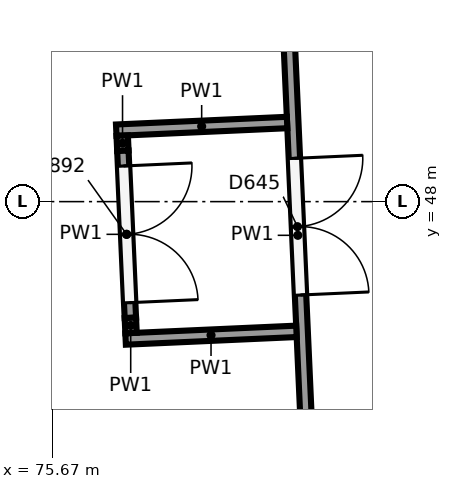
"""IFC4 building model, lengths in metres.
Left out: names, types, materials, properties, quantities, classifications, styles, units other than length and angle.
Written with IfcOpenShell. Run it as: python <this file> out.ifc"""

import sys

from ifc_helpers import new_model, si_unit, direction, frame, frame_2d, origin, place, context, subcontext, project, spatial, rectangle, extrude, element, fill, save


model = new_model("IFC4")
c1 = context("Model", 3, precision=1e-05, world=origin(), true_north=direction((0.0, 1.0)))
c2 = subcontext(c1, "Body", "Model", "MODEL_VIEW")
j1 = project(units=[si_unit("LENGTHUNIT", "METRE"), si_unit("PLANEANGLEUNIT", "RADIAN")], contexts=[c1])
p1 = place(None, origin())
s1 = spatial("IfcSite", under=j1, at=p1, CompositionType="ELEMENT")
p2 = place(p1, origin())
s2 = spatial("IfcBuilding", under=s1, at=p2, CompositionType="ELEMENT")
p3 = place(p2, frame((0.0, 0.0, 6.5)))
s3 = spatial("IfcBuildingStorey", under=s2, at=p3, CompositionType="ELEMENT", Elevation=6.5)
p4 = place(p3, frame((78.691, 52.266, 0.0), z_axis=(0.0, 0.0, 1.0), x_axis=(0.044749816806, -0.998998225172, 0.0)))
e1 = element("IfcWall", 1, at=p4, inside=s3, PredefinedType="PARTITIONING", context=c2, shape_type="SweptSolid", body=[
    extrude(rectangle(XDim=9.427, YDim=0.15, at=frame_2d((4.714, 0.0))), origin(), (0.0, 0.0, 1.0), 5.15),
])
p5 = place(p4, frame((3.7, 0.0, 0.0)))
e2 = element("IfcOpeningElement", 2, at=p5, cuts=e1, PredefinedType="OPENING", context=c2, shape_type="SweptSolid", body=[
    extrude(rectangle(XDim=1.8, YDim=2.1, at=frame_2d((0.9, 1.05))), frame((0.0, 0.085, 0.0), z_axis=(0.0, -1.0, 0.0), x_axis=(1.0, 0.0, 0.0)), (0.0, 0.0, 1.0), 0.17),
])
p6 = place(p3, frame((78.761, 49.041, 0.0), z_axis=(0.0, 0.0, 1.0), x_axis=(-0.998995432738, -0.044812111841, 0.0)))
e3 = element("IfcWall", 3, at=p6, inside=s3, PredefinedType="PARTITIONING", context=c2, shape_type="SweptSolid", body=[
    extrude(rectangle(XDim=2.25, YDim=0.15, at=frame_2d((1.125, 0.0))), origin(), (0.0, 0.0, 1.0), 5.15),
])
p7 = place(p3, frame((78.884, 46.293, 0.0), z_axis=(0.0, 0.0, 1.0), x_axis=(-0.998995214814, -0.044816969772, 0.0)))
e4 = element("IfcWall", 4, at=p7, inside=s3, PredefinedType="PARTITIONING", context=c2, shape_type="SweptSolid", body=[
    extrude(rectangle(XDim=2.25, YDim=0.15, at=frame_2d((1.125, 0.0))), origin(), (0.0, 0.0, 1.0), 5.15),
])
p8 = place(p3, frame((76.591, 48.868, 0.0), z_axis=(0.0, 0.0, 1.0), x_axis=(0.04518607304, -0.99897858776, 0.0)))
e5 = element("IfcWall", 5, at=p8, inside=s3, PredefinedType="PARTITIONING", context=c2, shape_type="SweptSolid", body=[
    extrude(rectangle(XDim=0.2, YDim=0.15, at=frame_2d((0.1, 0.0))), origin(), (0.0, 0.0, 1.0), 5.15),
])
p9 = place(p3, frame((76.6, 48.669, 0.0), z_axis=(0.0, 0.0, 1.0), x_axis=(0.04471807814, -0.99899964639, 0.0)))
e6 = element("IfcWall", 6, at=p9, inside=s3, PredefinedType="PARTITIONING", context=c2, shape_type="SweptSolid", body=[
    extrude(rectangle(XDim=2.2, YDim=0.15, at=frame_2d((1.1, 0.0))), origin(), (0.0, 0.0, 1.0), 5.15),
])
p10 = place(p9, frame((0.2, 0.0, 0.0)))
e7 = element("IfcOpeningElement", 7, at=p10, cuts=e6, PredefinedType="OPENING", context=c2, shape_type="SweptSolid", body=[
    extrude(rectangle(XDim=1.8, YDim=2.1, at=frame_2d((0.9, 1.05))), frame((0.0, 0.085, 0.0), z_axis=(0.0, -1.0, 0.0), x_axis=(1.0, 0.0, 0.0)), (0.0, 0.0, 1.0), 0.17),
])
p11 = place(p3, frame((76.699, 46.471, 0.0), z_axis=(0.0, 0.0, 1.0), x_axis=(0.04518607304, -0.99897858776, 0.0)))
e8 = element("IfcWall", 8, at=p11, inside=s3, PredefinedType="PARTITIONING", context=c2, shape_type="SweptSolid", body=[
    extrude(rectangle(XDim=0.2, YDim=0.15, at=frame_2d((0.1, 0.0))), origin(), (0.0, 0.0, 1.0), 5.15),
])
p12 = place(p5, origin())
e9 = element("IfcDoor", 9, at=p12, inside=s3, OperationType="DOUBLE_DOOR_SINGLE_SWING", PredefinedType="DOOR", context=c2, shape_type="SweptSolid", body=[
    extrude(rectangle(XDim=1.8, YDim=2.1, at=frame_2d((0.9, 1.05))), frame((0.0, 0.025, 0.0), z_axis=(0.0, -1.0, 0.0), x_axis=(1.0, 0.0, 0.0)), (0.0, 0.0, 1.0), 0.05),
])
fill(e2, e9)
p13 = place(p10, origin())
e10 = element("IfcDoor", 10, at=p13, inside=s3, OperationType="DOUBLE_DOOR_SINGLE_SWING", PredefinedType="DOOR", context=c2, shape_type="SweptSolid", body=[
    extrude(rectangle(XDim=1.8, YDim=2.1, at=frame_2d((0.9, 1.05))), frame((0.0, 0.025, 0.0), z_axis=(0.0, -1.0, 0.0), x_axis=(1.0, 0.0, 0.0)), (0.0, 0.0, 1.0), 0.05),
])
fill(e7, e10)
save(model, sys.argv[1])
